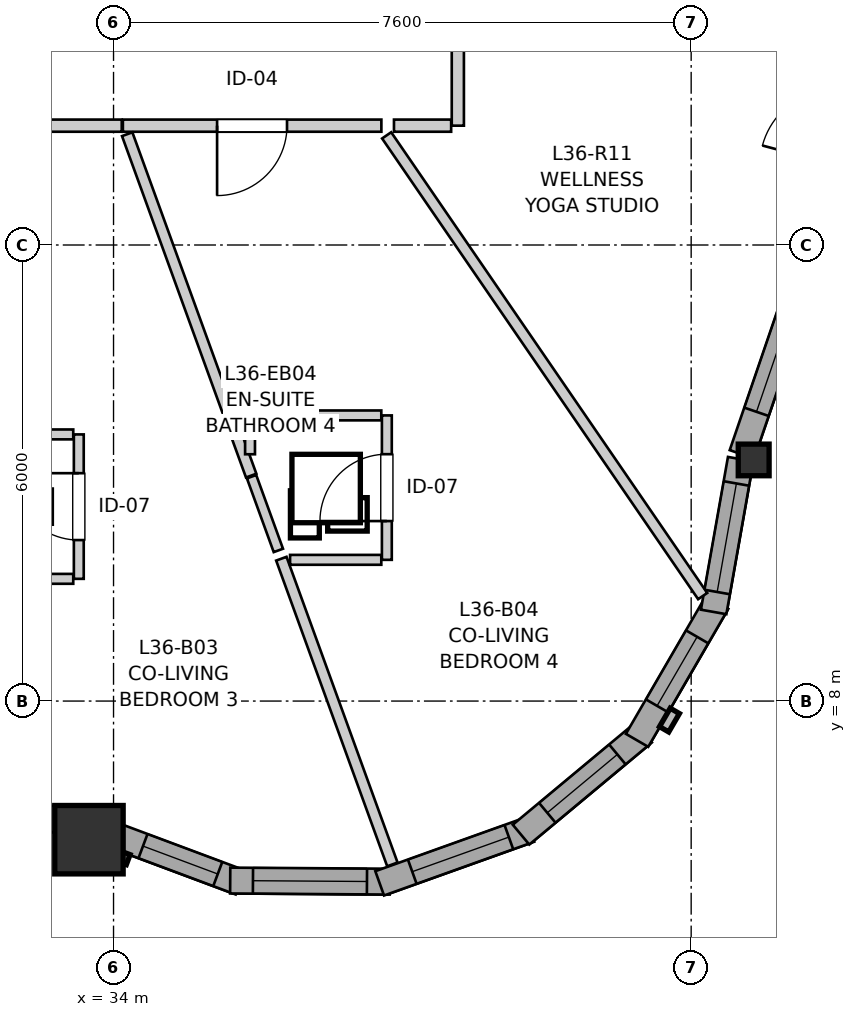
"""IFC4 building model, lengths in metres.
Left out: names, types, materials, properties, quantities, classifications, styles, units other than length and angle.
Written with IfcOpenShell. Run it as: python <this file> out.ifc"""

import sys

from ifc_helpers import new_model, si_unit, direction, frame, frame_2d, origin, origin_2d, place, context, subcontext, project, spatial, rectangle, i_section, extrude, source, transform, mapped, element, fill, save


model = new_model("IFC4")
c1 = context("Model", 3, precision=1e-05, world=origin(), true_north=direction((0.0, 1.0)))
c2 = subcontext(c1, "Body", "Model", "MODEL_VIEW")
j1 = project(units=[si_unit("LENGTHUNIT", "METRE"), si_unit("PLANEANGLEUNIT", "RADIAN")], contexts=[c1])
p1 = place(None, origin())
s1 = spatial("IfcSite", under=j1, at=p1, CompositionType="ELEMENT")
p2 = place(p1, origin())
s2 = spatial("IfcBuilding", under=s1, at=p2, CompositionType="ELEMENT")
p3 = place(p2, frame((0.0, 0.0, 121.6)))
s3 = spatial("IfcBuildingStorey", under=s2, at=p3, CompositionType="ELEMENT", Elevation=121.6)
m1 = source(origin(), c2, "Body", "SweptSolid", [
    extrude(rectangle(XDim=0.9, YDim=0.9, at=origin_2d()), origin(), (0.0, 0.0, 1.0), 2.95),
])
p4 = place(p3, frame((33.677, 6.176, 0.0), z_axis=(0.0, 0.0, 1.0), x_axis=(1.0, 0.0, 0.0)))
e1 = element("IfcColumn", 1, at=p4, inside=s3, PredefinedType="COLUMN", context=c2, shape_type="MappedRepresentation", body=[
    mapped(m1, transform((0.0, 0.0, 0.0), x_axis=(1.0, 0.0, 0.0), y_axis=(0.0, 1.0, 0.0), z_axis=(0.0, 0.0, 1.0), scale=1.0)),
])
m2 = source(origin(), c2, "Body", "SweptSolid", [
    extrude(i_section(OverallWidth=0.406, OverallDepth=0.416, WebThickness=0.027, FlangeThickness=0.044, FilletRadius=0.015, at=origin_2d()), origin(), (0.0, 0.0, 1.0), 2.95),
])
p5 = place(p3, frame((42.423, 11.172, 0.0), z_axis=(0.0, 0.0, 1.0), x_axis=(1.0, 0.0, 0.0)))
e2 = element("IfcColumn", 2, at=p5, inside=s3, PredefinedType="PILASTER", context=c2, shape_type="MappedRepresentation", body=[
    mapped(m2, transform((0.0, 0.0, 0.0), x_axis=(1.0, 0.0, 0.0), y_axis=(0.0, 1.0, 0.0), z_axis=(0.0, 0.0, 1.0), scale=1.0)),
])
p6 = place(p3, frame((30.652, 6.973, 0.0), z_axis=(0.0, 0.0, 1.0), x_axis=(0.979418300652, -0.201841007595, 0.0)))
e3 = element("IfcWall", 3, at=p6, inside=s3, PredefinedType="SOLIDWALL", context=c2, shape_type="SweptSolid", body=[
    extrude(rectangle(XDim=2.893, YDim=0.34, at=frame_2d((1.447, 0.0))), origin(), (0.0, 0.0, 1.0), 2.48),
])
p7 = place(p6, frame((0.383, 0.0, 0.82)))
e4 = element("IfcOpeningElement", 4, at=p7, cuts=e3, PredefinedType="OPENING", context=c2, shape_type="SweptSolid", body=[
    extrude(rectangle(XDim=0.58, YDim=1.35, at=frame_2d((0.29, 0.675))), frame((0.0, 0.18, 0.0), z_axis=(0.0, -1.0, 0.0), x_axis=(1.0, 0.0, 0.0)), (0.0, 0.0, 1.0), 0.36),
])
p8 = place(p6, frame((1.31, 0.0, 0.82)))
e5 = element("IfcOpeningElement", 5, at=p8, cuts=e3, PredefinedType="OPENING", context=c2, shape_type="SweptSolid", body=[
    extrude(rectangle(XDim=1.15, YDim=1.2, at=frame_2d((0.575, 0.6))), frame((0.0, 0.18, 0.0), z_axis=(0.0, -1.0, 0.0), x_axis=(1.0, 0.0, 0.0)), (0.0, 0.0, 1.0), 0.36),
])
p9 = place(p3, frame((33.952, 6.255, 0.0), z_axis=(0.0, 0.0, 1.0), x_axis=(0.936799566991, -0.349866504951, 0.0)))
e6 = element("IfcWall", 6, at=p9, inside=s3, PredefinedType="SOLIDWALL", context=c2, shape_type="SweptSolid", body=[
    extrude(rectangle(XDim=1.831, YDim=0.34, at=frame_2d((0.916, 0.0))), origin(), (0.0, 0.0, 1.0), 2.48),
])
p10 = place(p9, frame((0.466, 0.0, 0.82)))
e7 = element("IfcOpeningElement", 7, at=p10, cuts=e6, PredefinedType="OPENING", context=c2, shape_type="SweptSolid", body=[
    extrude(rectangle(XDim=1.05, YDim=1.45, at=frame_2d((0.525, 0.725))), frame((0.0, 0.18, 0.0), z_axis=(0.0, -1.0, 0.0), x_axis=(1.0, 0.0, 0.0)), (0.0, 0.0, 1.0), 0.36),
])
p11 = place(p3, frame((35.535, 5.639, 0.0), z_axis=(0.0, 0.0, 1.0), x_axis=(0.999976456891, -0.00686189939, 0.0)))
e8 = element("IfcWall", 8, at=p11, inside=s3, PredefinedType="SOLIDWALL", context=c2, shape_type="SweptSolid", body=[
    extrude(rectangle(XDim=2.099, YDim=0.34, at=frame_2d((1.05, 0.0))), origin(), (0.0, 0.0, 1.0), 2.48),
])
p12 = place(p11, frame((0.3, 0.0, 0.82)))
e9 = element("IfcOpeningElement", 9, at=p12, cuts=e8, PredefinedType="OPENING", context=c2, shape_type="SweptSolid", body=[
    extrude(rectangle(XDim=1.5, YDim=1.45, at=frame_2d((0.75, 0.725))), frame((0.0, 0.18, 0.0), z_axis=(0.0, -1.0, 0.0), x_axis=(1.0, 0.0, 0.0)), (0.0, 0.0, 1.0), 0.36),
])
p13 = place(p3, frame((37.502, 5.602, 0.0), z_axis=(0.0, 0.0, 1.0), x_axis=(0.941523304278, 0.336947870598, 0.0)))
e10 = element("IfcWall", 10, at=p13, inside=s3, PredefinedType="SOLIDWALL", context=c2, shape_type="SweptSolid", body=[
    extrude(rectangle(XDim=2.099, YDim=0.34, at=frame_2d((1.05, 0.0))), origin(), (0.0, 0.0, 1.0), 2.48),
])
p14 = place(p13, frame((0.455, 0.0, 0.82)))
e11 = element("IfcOpeningElement", 11, at=p14, cuts=e10, PredefinedType="OPENING", context=c2, shape_type="SweptSolid", body=[
    extrude(rectangle(XDim=1.35, YDim=1.45, at=frame_2d((0.675, 0.725))), frame((0.0, 0.18, 0.0), z_axis=(0.0, -1.0, 0.0), x_axis=(1.0, 0.0, 0.0)), (0.0, 0.0, 1.0), 0.36),
])
p15 = place(p3, frame((39.362, 6.242, 0.0), z_axis=(0.0, 0.0, 1.0), x_axis=(0.768440501876, 0.639921241308, 0.0)))
e12 = element("IfcWall", 12, at=p15, inside=s3, PredefinedType="SOLIDWALL", context=c2, shape_type="SweptSolid", body=[
    extrude(rectangle(XDim=2.099, YDim=0.34, at=frame_2d((1.05, 0.0))), origin(), (0.0, 0.0, 1.0), 2.48),
])
p16 = place(p15, frame((0.449, 0.0, 0.82)))
e13 = element("IfcOpeningElement", 13, at=p16, cuts=e12, PredefinedType="OPENING", context=c2, shape_type="SweptSolid", body=[
    extrude(rectangle(XDim=1.2, YDim=1.45, at=frame_2d((0.6, 0.725))), frame((0.0, 0.18, 0.0), z_axis=(0.0, -1.0, 0.0), x_axis=(1.0, 0.0, 0.0)), (0.0, 0.0, 1.0), 0.36),
])
p17 = place(p3, frame((40.888, 7.483, 0.0), z_axis=(0.0, 0.0, 1.0), x_axis=(0.501902596059, 0.864924149315, 0.0)))
e14 = element("IfcWall", 14, at=p17, inside=s3, PredefinedType="SOLIDWALL", context=c2, shape_type="SweptSolid", body=[
    extrude(rectangle(XDim=2.099, YDim=0.34, at=frame_2d((1.049, 0.0))), origin(), (0.0, 0.0, 1.0), 2.48),
])
p18 = place(p17, frame((0.524, 0.0, 0.82)))
e15 = element("IfcOpeningElement", 15, at=p18, cuts=e14, PredefinedType="OPENING", context=c2, shape_type="SweptSolid", body=[
    extrude(rectangle(XDim=1.05, YDim=1.45, at=frame_2d((0.525, 0.725))), frame((0.0, 0.18, 0.0), z_axis=(0.0, -1.0, 0.0), x_axis=(1.0, 0.0, 0.0)), (0.0, 0.0, 1.0), 0.36),
])
p19 = place(p3, frame((41.896, 9.173, 0.0), z_axis=(0.0, 0.0, 1.0), x_axis=(0.174399433509, 0.984674990843, 0.0)))
e16 = element("IfcWall", 16, at=p19, inside=s3, PredefinedType="SOLIDWALL", context=c2, shape_type="SweptSolid", body=[
    extrude(rectangle(XDim=2.041, YDim=0.34, at=frame_2d((1.021, 0.0))), origin(), (0.0, 0.0, 1.0), 2.48),
])
p20 = place(p19, frame((0.267, 0.0, 0.82)))
e17 = element("IfcOpeningElement", 17, at=p20, cuts=e16, PredefinedType="OPENING", context=c2, shape_type="SweptSolid", body=[
    extrude(rectangle(XDim=1.45, YDim=1.25, at=frame_2d((0.725, 0.625))), frame((0.0, 0.18, 0.0), z_axis=(0.0, -1.0, 0.0), x_axis=(1.0, 0.0, 0.0)), (0.0, 0.0, 1.0), 0.36),
])
p21 = place(p3, frame((42.268, 11.246, 0.0), z_axis=(0.0, 0.0, 1.0), x_axis=(0.323583674973, 0.946199558915, 0.0)))
e18 = element("IfcWall", 18, at=p21, inside=s3, PredefinedType="SOLIDWALL", context=c2, shape_type="SweptSolid", body=[
    extrude(rectangle(XDim=3.152, YDim=0.34, at=frame_2d((1.576, 0.0))), origin(), (0.0, 0.0, 1.0), 2.48),
])
p22 = place(p21, frame((0.591, 0.0, 0.82)))
e19 = element("IfcOpeningElement", 19, at=p22, cuts=e18, PredefinedType="OPENING", context=c2, shape_type="SweptSolid", body=[
    extrude(rectangle(XDim=1.95, YDim=1.4, at=frame_2d((0.975, 0.7))), frame((0.0, 0.18, 0.0), z_axis=(0.0, -1.0, 0.0), x_axis=(1.0, 0.0, 0.0)), (0.0, 0.0, 1.0), 0.36),
])
p23 = place(p3, frame((38.53, 21.321, 0.0), z_axis=(0.0, 0.0, 1.0), x_axis=(0.0, -1.0, 0.0)))
e20 = element("IfcWall", 20, at=p23, inside=s3, PredefinedType="PARTITIONING", context=c2, shape_type="SweptSolid", body=[
    extrude(rectangle(XDim=5.751, YDim=0.16, at=frame_2d((2.875, 0.0))), origin(), (0.0, 0.0, 1.0), 2.95),
])
p24 = place(p23, frame((2.404, 0.0, 0.0)))
e21 = element("IfcOpeningElement", 21, at=p24, cuts=e20, PredefinedType="OPENING", context=c2, shape_type="SweptSolid", body=[
    extrude(rectangle(XDim=0.96, YDim=2.1, at=frame_2d((0.48, 1.05))), frame((0.0, 0.09, 0.0), z_axis=(0.0, -1.0, 0.0), x_axis=(1.0, 0.0, 0.0)), (0.0, 0.0, 1.0), 0.18),
])
p25 = place(p3, frame((37.524, 15.57, 0.0), z_axis=(0.0, 0.0, 1.0), x_axis=(-1.0, 0.0, 0.0)))
e22 = element("IfcWall", 22, at=p25, inside=s3, PredefinedType="PARTITIONING", context=c2, shape_type="SweptSolid", body=[
    extrude(rectangle(XDim=3.401, YDim=0.16, at=frame_2d((1.7, 0.0))), origin(), (0.0, 0.0, 1.0), 2.95),
])
p26 = place(p25, frame((1.241, 0.0, 0.0)))
e23 = element("IfcOpeningElement", 23, at=p26, cuts=e22, PredefinedType="OPENING", context=c2, shape_type="SweptSolid", body=[
    extrude(rectangle(XDim=0.92, YDim=2.1, at=frame_2d((0.46, 1.05))), frame((0.0, 0.09, 0.0), z_axis=(0.0, -1.0, 0.0), x_axis=(1.0, 0.0, 0.0)), (0.0, 0.0, 1.0), 0.18),
])
p27 = place(p3, frame((34.108, 15.57, 0.0), z_axis=(0.0, 0.0, 1.0), x_axis=(-1.0, 0.0, 0.0)))
e24 = element("IfcWall", 24, at=p27, inside=s3, PredefinedType="PARTITIONING", context=c2, shape_type="SweptSolid", body=[
    extrude(rectangle(XDim=2.869, YDim=0.16, at=frame_2d((1.435, 0.0))), origin(), (0.0, 0.0, 1.0), 2.95),
])
p28 = place(p27, frame((0.974, 0.0, 0.0)))
e25 = element("IfcOpeningElement", 25, at=p28, cuts=e24, PredefinedType="OPENING", context=c2, shape_type="SweptSolid", body=[
    extrude(rectangle(XDim=0.92, YDim=2.1, at=frame_2d((0.46, 1.05))), frame((0.0, 0.09, 0.0), z_axis=(0.0, -1.0, 0.0), x_axis=(1.0, 0.0, 0.0)), (0.0, 0.0, 1.0), 0.18),
])
p29 = place(p3, frame((33.543, 9.608, 0.0), z_axis=(0.0, 0.0, 1.0), x_axis=(0.0, 1.0, 0.0)))
e26 = element("IfcWall", 26, at=p29, inside=s3, PredefinedType="PARTITIONING", context=c2, shape_type="SweptSolid", body=[
    extrude(rectangle(XDim=1.9, YDim=0.13, at=frame_2d((0.95, 0.0))), origin(), (0.0, 0.0, 1.0), 2.95),
])
p30 = place(p29, frame((0.51, 0.0, 0.0)))
e27 = element("IfcOpeningElement", 27, at=p30, cuts=e26, PredefinedType="OPENING", context=c2, shape_type="SweptSolid", body=[
    extrude(rectangle(XDim=0.88, YDim=2.05, at=frame_2d((0.44, 1.025))), frame((0.0, 0.075, 0.0), z_axis=(0.0, -1.0, 0.0), x_axis=(1.0, 0.0, 0.0)), (0.0, 0.0, 1.0), 0.15),
])
p31 = place(p3, frame((37.596, 9.858, 0.0), z_axis=(0.0, 0.0, 1.0), x_axis=(0.0, 1.0, 0.0)))
e28 = element("IfcWall", 28, at=p31, inside=s3, PredefinedType="PARTITIONING", context=c2, shape_type="SweptSolid", body=[
    extrude(rectangle(XDim=1.9, YDim=0.13, at=frame_2d((0.95, 0.0))), origin(), (0.0, 0.0, 1.0), 2.95),
])
p32 = place(p31, frame((0.51, 0.0, 0.0)))
e29 = element("IfcOpeningElement", 29, at=p32, cuts=e28, PredefinedType="OPENING", context=c2, shape_type="SweptSolid", body=[
    extrude(rectangle(XDim=0.88, YDim=2.05, at=frame_2d((0.44, 1.025))), frame((0.0, 0.075, 0.0), z_axis=(0.0, -1.0, 0.0), x_axis=(1.0, 0.0, 0.0)), (0.0, 0.0, 1.0), 0.15),
])
p33 = place(p3, frame((37.594, 15.442, 0.0), z_axis=(0.0, 0.0, 1.0), x_axis=(0.565681325722, -0.824623937155, 0.0)))
e30 = element("IfcWall", 30, at=p33, inside=s3, PredefinedType="PARTITIONING", context=c2, shape_type="SweptSolid", body=[
    extrude(rectangle(XDim=7.35, YDim=0.145, at=frame_2d((3.675, 0.0))), origin(), (0.0, 0.0, 1.0), 2.95),
])
p34 = place(p3, frame((34.18, 15.458, 0.0), z_axis=(0.0, 0.0, 1.0), x_axis=(0.341373856507, -0.939927598325, 0.0)))
e31 = element("IfcWall", 31, at=p34, inside=s3, PredefinedType="PARTITIONING", context=c2, shape_type="SweptSolid", body=[
    extrude(rectangle(XDim=4.779, YDim=0.145, at=frame_2d((2.389, 0.0))), origin(), (0.0, 0.0, 1.0), 2.95),
])
p35 = place(p3, frame((36.208, 9.873, 0.0), z_axis=(0.0, 0.0, 1.0), x_axis=(0.341362804218, -0.939931612351, 0.0)))
e32 = element("IfcWall", 32, at=p35, inside=s3, PredefinedType="PARTITIONING", context=c2, shape_type="SweptSolid", body=[
    extrude(rectangle(XDim=4.279, YDim=0.145, at=frame_2d((2.14, 0.0))), origin(), (0.0, 0.0, 1.0), 2.95),
])
p36 = place(p3, frame((31.743, 11.508, 0.0), z_axis=(0.0, 0.0, 1.0), x_axis=(1.0, 0.0, 0.0)))
e33 = element("IfcWall", 33, at=p36, inside=s3, PredefinedType="PARTITIONING", context=c2, shape_type="SweptSolid", body=[
    extrude(rectangle(XDim=1.727, YDim=0.13, at=frame_2d((0.864, 0.0))), origin(), (0.0, 0.0, 1.0), 2.95),
])
p37 = place(p3, frame((31.829, 9.608, 0.0), z_axis=(0.0, 0.0, 1.0), x_axis=(1.0, 0.0, 0.0)))
e34 = element("IfcWall", 34, at=p37, inside=s3, PredefinedType="PARTITIONING", context=c2, shape_type="SweptSolid", body=[
    extrude(rectangle(XDim=1.641, YDim=0.13, at=frame_2d((0.82, 0.0))), origin(), (0.0, 0.0, 1.0), 2.558),
])
p38 = place(p3, frame((35.796, 11.758, 0.0), z_axis=(0.0, 0.0, 1.0), x_axis=(1.0, 0.0, 0.0)))
e35 = element("IfcWall", 35, at=p38, inside=s3, PredefinedType="PARTITIONING", context=c2, shape_type="SweptSolid", body=[
    extrude(rectangle(XDim=1.727, YDim=0.13, at=frame_2d((0.864, 0.0))), origin(), (0.0, 0.0, 1.0), 2.95),
])
p39 = place(p3, frame((36.323, 9.858, 0.0), z_axis=(0.0, 0.0, 1.0), x_axis=(1.0, 0.0, 0.0)))
e36 = element("IfcWall", 36, at=p39, inside=s3, PredefinedType="PARTITIONING", context=c2, shape_type="SweptSolid", body=[
    extrude(rectangle(XDim=1.2, YDim=0.13, at=frame_2d((0.6, 0.0))), origin(), (0.0, 0.0, 1.0), 2.95),
])
p40 = place(p3, frame((35.816, 10.952, 0.0), z_axis=(0.0, 0.0, 1.0), x_axis=(0.341515178303, -0.939876259403, 0.0)))
e37 = element("IfcWall", 37, at=p40, inside=s3, PredefinedType="PARTITIONING", context=c2, shape_type="SweptSolid", body=[
    extrude(rectangle(XDim=1.032, YDim=0.13, at=frame_2d((0.516, 0.0))), origin(), (0.0, 0.0, 1.0), 2.95),
])
p41 = place(p3, frame((37.69, 15.57, 0.0), z_axis=(0.0, 0.0, 1.0), x_axis=(1.0, 0.0, 0.0)))
e38 = element("IfcWall", 38, at=p41, inside=s3, PredefinedType="PARTITIONING", context=c2, shape_type="SweptSolid", body=[
    extrude(rectangle(XDim=0.752, YDim=0.16, at=frame_2d((0.376, 0.0))), origin(), (0.0, 0.0, 1.0), 2.95),
])
p42 = place(p3, frame((35.796, 11.247, 0.0), z_axis=(0.0, 0.0, 1.0), x_axis=(0.0, 1.0, 0.0)))
e39 = element("IfcWall", 39, at=p42, inside=s3, PredefinedType="PARTITIONING", context=c2, shape_type="SweptSolid", body=[
    extrude(rectangle(XDim=0.438, YDim=0.13, at=frame_2d((0.219, 0.0))), origin(), (0.0, 0.0, 1.0), 2.95),
])
m3 = source(origin(), c2, "Body", "SweptSolid", [
    extrude(rectangle(XDim=1.05, YDim=1.45, at=frame_2d((0.525, 0.725))), frame((0.0, 0.03, 0.0), z_axis=(0.0, -1.0, 0.0), x_axis=(1.0, 0.0, 0.0)), (0.0, 0.0, 1.0), 0.06),
])
p43 = place(p10, origin())
e40 = element("IfcWindow", 40, at=p43, inside=s3, PartitioningType="SINGLE_PANEL", PredefinedType="WINDOW", context=c2, shape_type="MappedRepresentation", body=[
    mapped(m3, transform((0.0, 0.0, 0.0), x_axis=(1.0, 0.0, 0.0), y_axis=(0.0, 1.0, 0.0), z_axis=(0.0, 0.0, 1.0), scale=1.0)),
])
fill(e7, e40)
m4 = source(origin(), c2, "Body", "SweptSolid", [
    extrude(rectangle(XDim=1.5, YDim=1.45, at=frame_2d((0.75, 0.725))), frame((0.0, 0.03, 0.0), z_axis=(0.0, -1.0, 0.0), x_axis=(1.0, 0.0, 0.0)), (0.0, 0.0, 1.0), 0.06),
])
p44 = place(p12, origin())
e41 = element("IfcWindow", 41, at=p44, inside=s3, PartitioningType="SINGLE_PANEL", PredefinedType="WINDOW", context=c2, shape_type="MappedRepresentation", body=[
    mapped(m4, transform((0.0, 0.0, 0.0), x_axis=(1.0, 0.0, 0.0), y_axis=(0.0, 1.0, 0.0), z_axis=(0.0, 0.0, 1.0), scale=1.0)),
])
fill(e9, e41)
m5 = source(origin(), c2, "Body", "SweptSolid", [
    extrude(rectangle(XDim=1.35, YDim=1.45, at=frame_2d((0.675, 0.725))), frame((0.0, 0.03, 0.0), z_axis=(0.0, -1.0, 0.0), x_axis=(1.0, 0.0, 0.0)), (0.0, 0.0, 1.0), 0.06),
])
p45 = place(p14, origin())
e42 = element("IfcWindow", 42, at=p45, inside=s3, PartitioningType="SINGLE_PANEL", PredefinedType="WINDOW", context=c2, shape_type="MappedRepresentation", body=[
    mapped(m5, transform((0.0, 0.0, 0.0), x_axis=(1.0, 0.0, 0.0), y_axis=(0.0, 1.0, 0.0), z_axis=(0.0, 0.0, 1.0), scale=1.0)),
])
fill(e11, e42)
m6 = source(origin(), c2, "Body", "SweptSolid", [
    extrude(rectangle(XDim=1.2, YDim=1.45, at=frame_2d((0.6, 0.725))), frame((0.0, 0.03, 0.0), z_axis=(0.0, -1.0, 0.0), x_axis=(1.0, 0.0, 0.0)), (0.0, 0.0, 1.0), 0.06),
])
p46 = place(p16, origin())
e43 = element("IfcWindow", 43, at=p46, inside=s3, PartitioningType="SINGLE_PANEL", PredefinedType="WINDOW", context=c2, shape_type="MappedRepresentation", body=[
    mapped(m6, transform((0.0, 0.0, 0.0), x_axis=(1.0, 0.0, 0.0), y_axis=(0.0, 1.0, 0.0), z_axis=(0.0, 0.0, 1.0), scale=1.0)),
])
fill(e13, e43)
p47 = place(p18, origin())
e44 = element("IfcWindow", 44, at=p47, inside=s3, PartitioningType="SINGLE_PANEL", PredefinedType="WINDOW", context=c2, shape_type="MappedRepresentation", body=[
    mapped(m3, transform((0.0, 0.0, 0.0), x_axis=(1.0, 0.0, 0.0), y_axis=(0.0, 1.0, 0.0), z_axis=(0.0, 0.0, 1.0), scale=1.0)),
])
fill(e15, e44)
m7 = source(origin(), c2, "Body", "SweptSolid", [
    extrude(rectangle(XDim=1.45, YDim=1.25, at=frame_2d((0.725, 0.625))), frame((0.0, 0.03, 0.0), z_axis=(0.0, -1.0, 0.0), x_axis=(1.0, 0.0, 0.0)), (0.0, 0.0, 1.0), 0.06),
])
p48 = place(p20, origin())
e45 = element("IfcWindow", 45, at=p48, inside=s3, PartitioningType="SINGLE_PANEL", PredefinedType="WINDOW", context=c2, shape_type="MappedRepresentation", body=[
    mapped(m7, transform((0.0, 0.0, 0.0), x_axis=(1.0, 0.0, 0.0), y_axis=(0.0, 1.0, 0.0), z_axis=(0.0, 0.0, 1.0), scale=1.0)),
])
fill(e17, e45)
m8 = source(origin(), c2, "Body", "SweptSolid", [
    extrude(rectangle(XDim=1.95, YDim=1.4, at=frame_2d((0.975, 0.7))), frame((0.0, 0.03, 0.0), z_axis=(0.0, -1.0, 0.0), x_axis=(1.0, 0.0, 0.0)), (0.0, 0.0, 1.0), 0.06),
])
p49 = place(p22, origin())
e46 = element("IfcWindow", 46, at=p49, inside=s3, PartitioningType="SINGLE_PANEL", PredefinedType="WINDOW", context=c2, shape_type="MappedRepresentation", body=[
    mapped(m8, transform((0.0, 0.0, 0.0), x_axis=(1.0, 0.0, 0.0), y_axis=(0.0, 1.0, 0.0), z_axis=(0.0, 0.0, 1.0), scale=1.0)),
])
fill(e19, e46)
m9 = source(origin(), c2, "Body", "SweptSolid", [
    extrude(rectangle(XDim=0.92, YDim=2.1, at=frame_2d((0.46, 1.05))), frame((0.0, 0.025, 0.0), z_axis=(0.0, -1.0, 0.0), x_axis=(1.0, 0.0, 0.0)), (0.0, 0.0, 1.0), 0.05),
])
p50 = place(p26, origin())
e47 = element("IfcDoor", 47, at=p50, inside=s3, OperationType="SINGLE_SWING_RIGHT", PredefinedType="DOOR", context=c2, shape_type="MappedRepresentation", body=[
    mapped(m9, transform((0.0, 0.0, 0.0), x_axis=(1.0, 0.0, 0.0), y_axis=(0.0, 1.0, 0.0), z_axis=(0.0, 0.0, 1.0), scale=1.0)),
])
fill(e23, e47)
m10 = source(origin(), c2, "Body", "SweptSolid", [
    extrude(rectangle(XDim=0.88, YDim=2.05, at=frame_2d((0.44, 1.025))), frame((0.0, 0.025, 0.0), z_axis=(0.0, -1.0, 0.0), x_axis=(1.0, 0.0, 0.0)), (0.0, 0.0, 1.0), 0.05),
])
p51 = place(p30, origin())
e48 = element("IfcDoor", 48, at=p51, inside=s3, OperationType="SINGLE_SWING_RIGHT", PredefinedType="DOOR", context=c2, shape_type="MappedRepresentation", body=[
    mapped(m10, transform((0.0, 0.0, 0.0), x_axis=(1.0, 0.0, 0.0), y_axis=(0.0, 1.0, 0.0), z_axis=(0.0, 0.0, 1.0), scale=1.0)),
])
fill(e27, e48)
p52 = place(p32, origin())
e49 = element("IfcDoor", 49, at=p52, inside=s3, OperationType="SINGLE_SWING_LEFT", PredefinedType="DOOR", context=c2, shape_type="MappedRepresentation", body=[
    mapped(m10, transform((0.0, 0.0, 0.0), x_axis=(1.0, 0.0, 0.0), y_axis=(0.0, 1.0, 0.0), z_axis=(0.0, 0.0, 1.0), scale=1.0)),
])
fill(e29, e49)
save(model, sys.argv[1])
